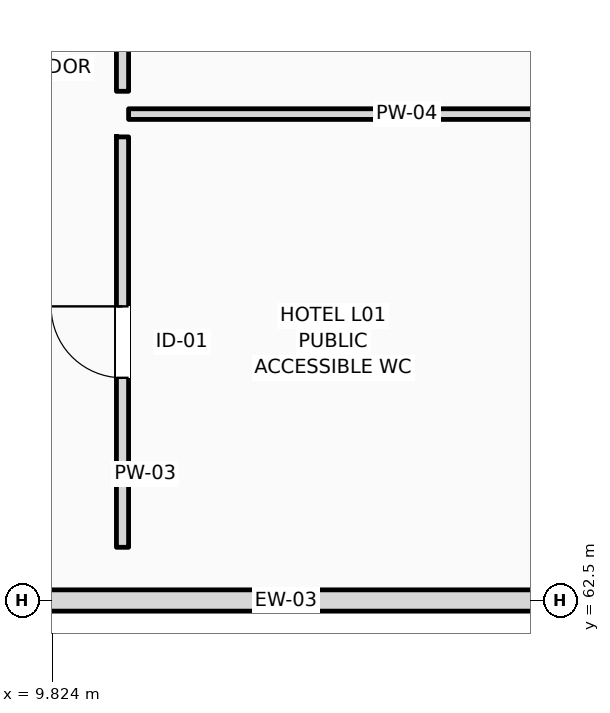
"""IFC4 building model, lengths in metres.
Left out: names, types, materials, properties, quantities, classifications, styles, units other than length and angle.
Written with IfcOpenShell. Run it as: python <this file> out.ifc"""

import sys

from ifc_helpers import new_model, si_unit, direction, frame, frame_2d, origin, place, context, subcontext, project, spatial, rectangle, extrude, element, fill, save


model = new_model("IFC4")
c1 = context("Model", 3, precision=1e-05, world=origin(), true_north=direction((0.0, 1.0)))
c2 = subcontext(c1, "Body", "Model", "MODEL_VIEW")
j1 = project(units=[si_unit("LENGTHUNIT", "METRE"), si_unit("PLANEANGLEUNIT", "RADIAN")], contexts=[c1])
p1 = place(None, origin())
s1 = spatial("IfcSite", under=j1, at=p1, CompositionType="ELEMENT")
p2 = place(p1, origin())
s2 = spatial("IfcBuilding", under=s1, at=p2, CompositionType="ELEMENT")
p3 = place(p2, frame((0.0, 0.0, 6.0)))
s3 = spatial("IfcBuildingStorey", under=s2, at=p3, CompositionType="ELEMENT", Elevation=6.0)
p4 = place(p3, frame((0.0, 62.5, 0.0), z_axis=(0.0, 0.0, 1.0), x_axis=(1.0, 0.0, 0.0)))
e1 = element("IfcWall", 1, at=p4, inside=s3, PredefinedType="STANDARD", context=c2, shape_type="SweptSolid", body=[
    extrude(rectangle(XDim=25.2, YDim=0.28, at=frame_2d((12.6, 0.0))), origin(), (0.0, 0.0, 1.0), 2.84),
])
p5 = place(p3, frame((10.75, 63.2, 0.0), z_axis=(0.0, 0.0, 1.0), x_axis=(0.0, 1.0, 0.0)))
e2 = element("IfcWall", 2, at=p5, inside=s3, PredefinedType="PARTITIONING", context=c2, shape_type="SweptSolid", body=[
    extrude(rectangle(XDim=5.4, YDim=0.16, at=frame_2d((2.7, 0.0))), origin(), (0.0, 0.0, 1.0), 5.05),
])
p6 = place(p5, frame((2.23, 0.0, 0.0)))
e3 = element("IfcOpeningElement", 3, at=p6, cuts=e2, PredefinedType="OPENING", context=c2, shape_type="SweptSolid", body=[
    extrude(rectangle(XDim=0.94, YDim=2.15, at=frame_2d((0.47, 1.075))), frame((0.0, 0.09, 0.0), z_axis=(0.0, -1.0, 0.0), x_axis=(1.0, 0.0, 0.0)), (0.0, 0.0, 1.0), 0.18),
])
p7 = place(p3, frame((10.75, 69.2, 0.0), z_axis=(0.0, 0.0, 1.0), x_axis=(0.0, 1.0, 0.0)))
e4 = element("IfcWall", 4, at=p7, inside=s3, PredefinedType="PARTITIONING", context=c2, shape_type="SweptSolid", body=[
    extrude(rectangle(XDim=9.2, YDim=0.16, at=frame_2d((4.6, 0.0))), origin(), (0.0, 0.0, 1.0), 5.05),
])
p8 = place(p7, frame((4.15, 0.0, 0.0)))
e5 = element("IfcOpeningElement", 5, at=p8, cuts=e4, PredefinedType="OPENING", context=c2, shape_type="SweptSolid", body=[
    extrude(rectangle(XDim=0.9, YDim=2.1, at=frame_2d((0.45, 1.05))), frame((0.0, 0.09, 0.0), z_axis=(0.0, -1.0, 0.0), x_axis=(1.0, 0.0, 0.0)), (0.0, 0.0, 1.0), 0.18),
])
p9 = place(p3, frame((10.83, 68.9, 0.0), z_axis=(0.0, 0.0, 1.0), x_axis=(1.0, 0.0, 0.0)))
e6 = element("IfcWall", 6, at=p9, inside=s3, PredefinedType="PARTITIONING", context=c2, shape_type="SweptSolid", body=[
    extrude(rectangle(XDim=6.72, YDim=0.14, at=frame_2d((3.36, 0.0))), origin(), (0.0, 0.0, 1.0), 5.05),
])
p10 = place(p6, origin())
e7 = element("IfcDoor", 7, at=p10, inside=s3, OperationType="SINGLE_SWING_RIGHT", PredefinedType="DOOR", context=c2, shape_type="SweptSolid", body=[
    extrude(rectangle(XDim=0.94, YDim=2.15, at=frame_2d((0.47, 1.075))), frame((0.0, 0.025, 0.0), z_axis=(0.0, -1.0, 0.0), x_axis=(1.0, 0.0, 0.0)), (0.0, 0.0, 1.0), 0.05),
])
fill(e3, e7)
save(model, sys.argv[1])
